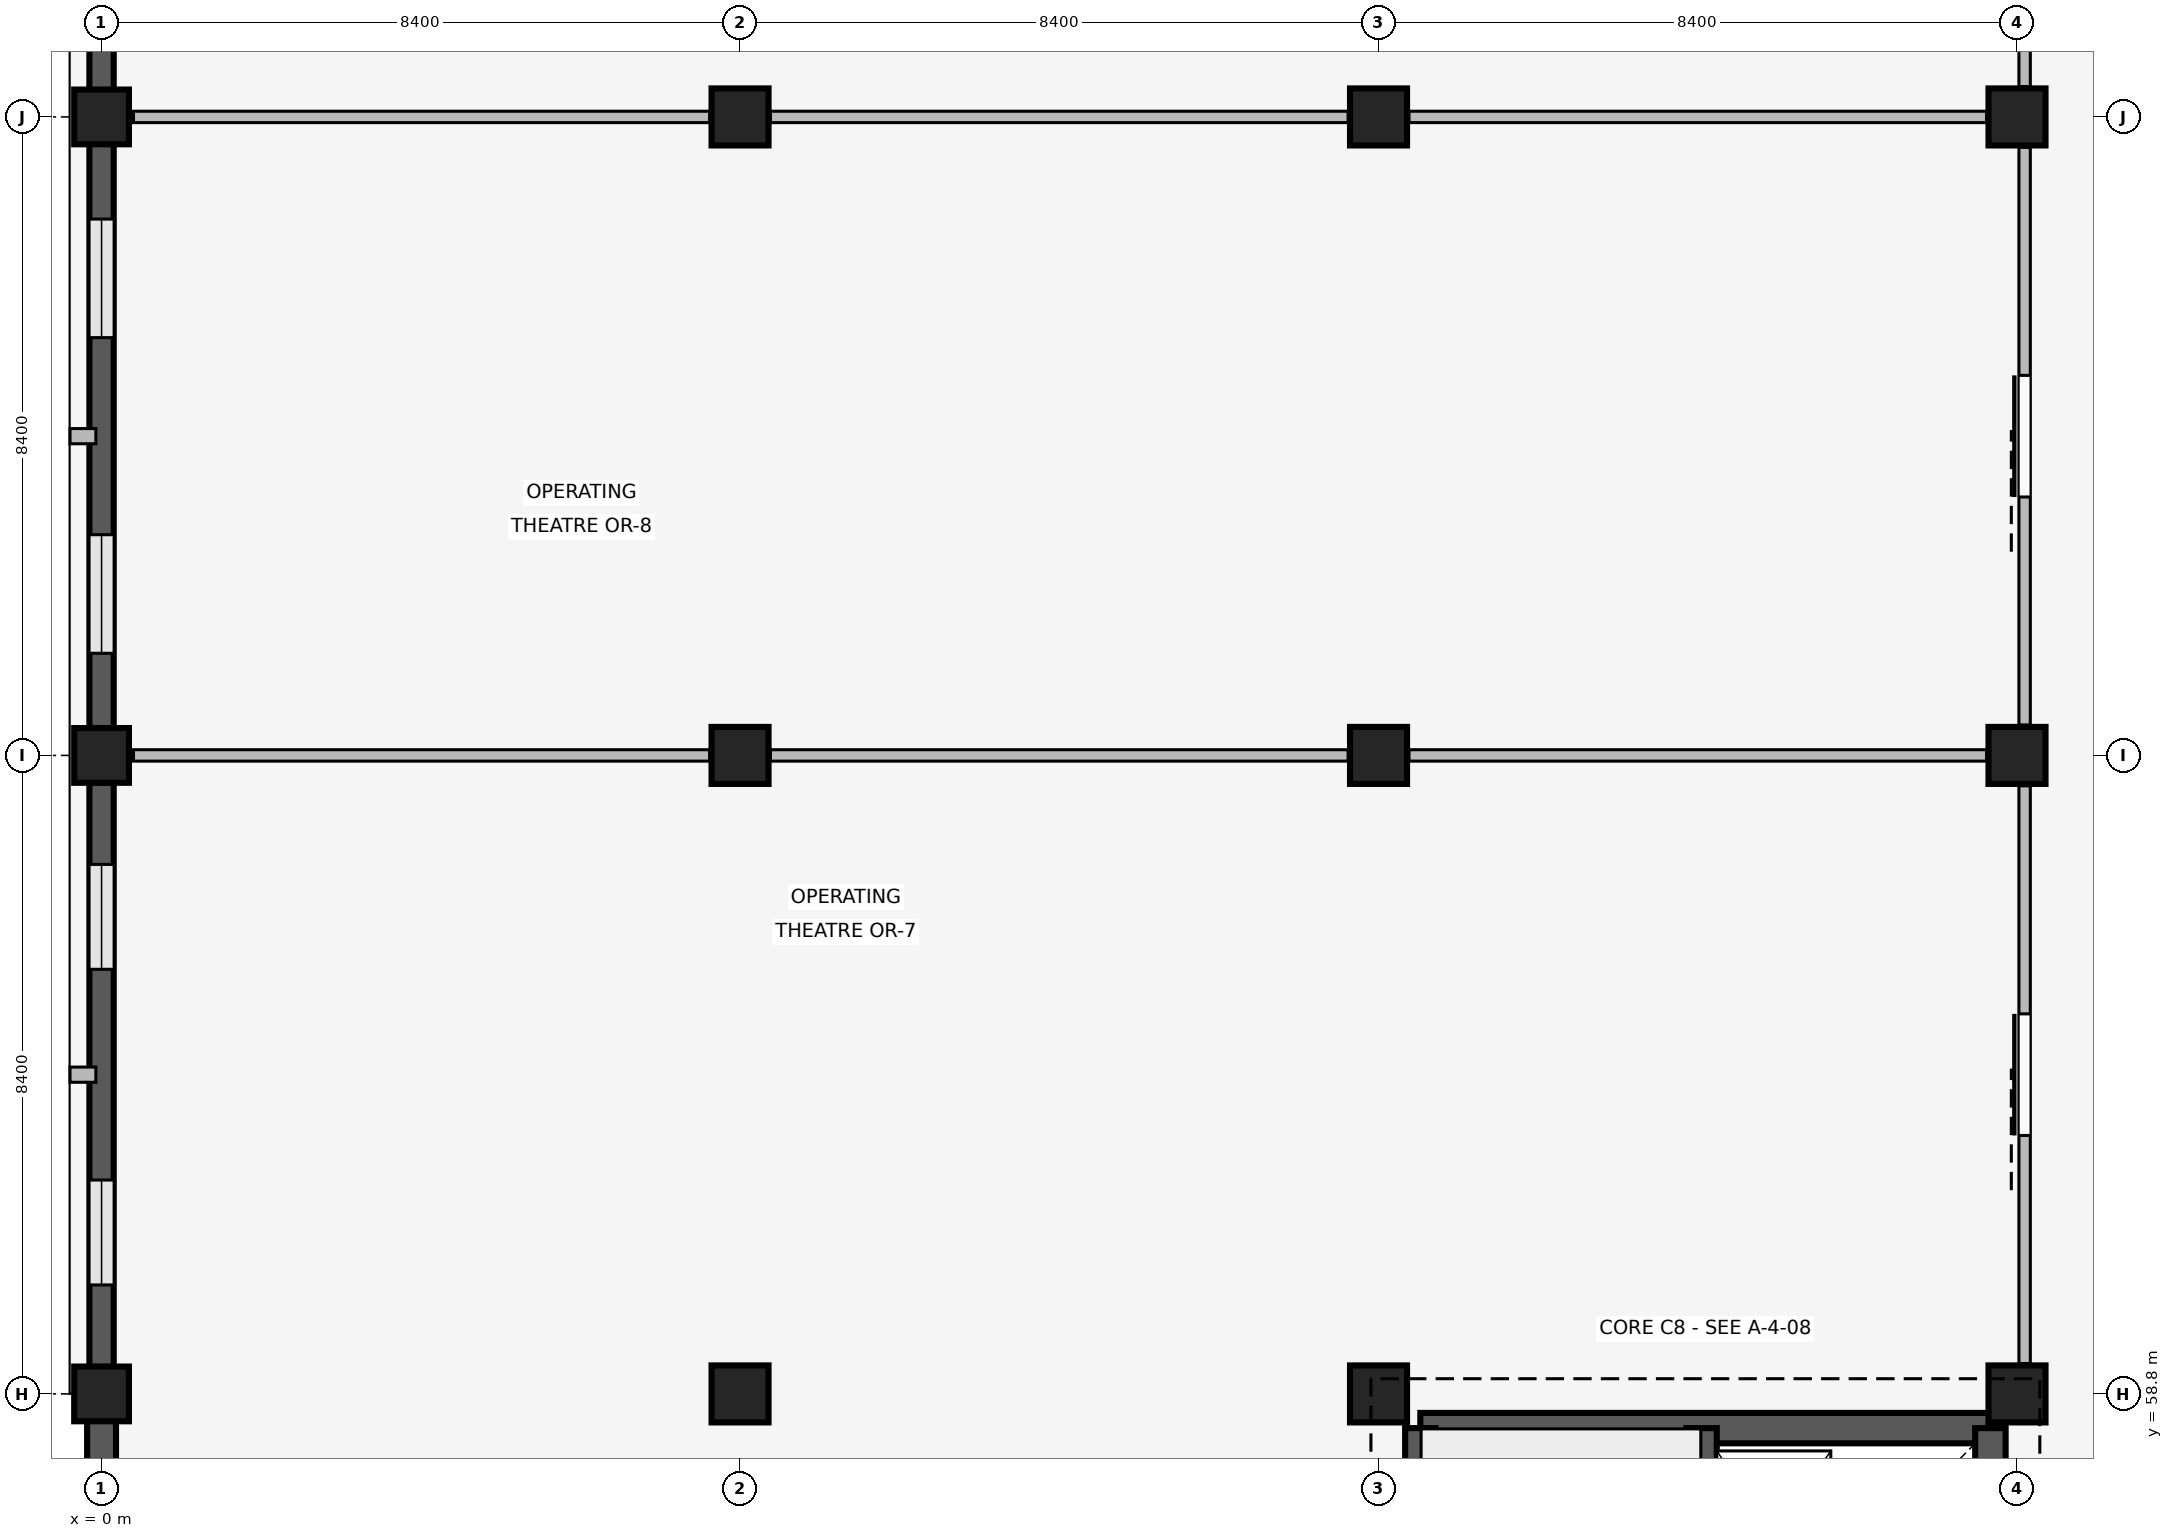
"""IFC4 building model, lengths in metres.
Left out: names, types, materials, properties, quantities, classifications, styles, units other than length and angle.
Written with IfcOpenShell. Run it as: python <this file> out.ifc"""

import sys

from ifc_helpers import new_model, si_unit, direction, frame, frame_2d, origin, origin_2d, place, context, subcontext, project, spatial, rectangle, extrude, element, fill, save


model = new_model("IFC4")
c1 = context("Model", 3, precision=1e-05, world=origin(), true_north=direction((0.0, 1.0)))
c2 = subcontext(c1, "Body", "Model", "MODEL_VIEW")
j1 = project(units=[si_unit("LENGTHUNIT", "METRE"), si_unit("PLANEANGLEUNIT", "RADIAN")], contexts=[c1])
p1 = place(None, origin())
s1 = spatial("IfcSite", under=j1, at=p1, CompositionType="ELEMENT")
p2 = place(p1, origin())
s2 = spatial("IfcBuilding", under=s1, at=p2, CompositionType="ELEMENT")
p3 = place(p2, frame((0.0, 0.0, 8.1)))
s3 = spatial("IfcBuildingStorey", under=s2, at=p3, CompositionType="ELEMENT", Elevation=8.1)
for number, where, z_axis, x_axis in (
    (1, (0.0, 58.8, 0.0), (0.0, 0.0, 1.0), (1.0, 0.0, 0.0)),
    (2, (0.0, 67.2, 0.0), (0.0, 0.0, 1.0), (1.0, 0.0, 0.0)),
    (3, (0.0, 75.6, 0.0), (0.0, 0.0, 1.0), (1.0, 0.0, 0.0)),
):
    element("IfcColumn", number, at=place(p3, frame(where, z_axis=z_axis, x_axis=x_axis)), inside=s3, PredefinedType="COLUMN", context=c2, shape_type="SweptSolid", body=[
        extrude(rectangle(XDim=0.72, YDim=0.72, at=origin_2d()), origin(), (0.0, 0.0, 1.0), 4.8),
    ])
for number, where, z_axis, x_axis in (
    (4, (8.4, 58.8, 0.0), (0.0, 0.0, 1.0), (1.0, 0.0, 0.0)),
    (5, (8.4, 67.2, 0.0), (0.0, 0.0, 1.0), (1.0, 0.0, 0.0)),
    (6, (8.4, 75.6, 0.0), (0.0, 0.0, 1.0), (1.0, 0.0, 0.0)),
    (7, (16.8, 58.8, 0.0), (0.0, 0.0, 1.0), (1.0, 0.0, 0.0)),
    (8, (16.8, 67.2, 0.0), (0.0, 0.0, 1.0), (1.0, 0.0, 0.0)),
    (9, (16.8, 75.6, 0.0), (0.0, 0.0, 1.0), (1.0, 0.0, 0.0)),
    (10, (25.2, 58.8, 0.0), (0.0, 0.0, 1.0), (1.0, 0.0, 0.0)),
    (11, (25.2, 67.2, 0.0), (0.0, 0.0, 1.0), (1.0, 0.0, 0.0)),
    (12, (25.2, 75.6, 0.0), (0.0, 0.0, 1.0), (1.0, 0.0, 0.0)),
):
    element("IfcColumn", number, at=place(p3, frame(where, z_axis=z_axis, x_axis=x_axis)), inside=s3, PredefinedType="COLUMN", context=c2, shape_type="SweptSolid", body=[
        extrude(rectangle(XDim=0.75, YDim=0.75, at=origin_2d()), origin(), (0.0, 0.0, 1.0), 4.8),
    ])
p4 = place(p3, frame((0.0, 50.755, 0.0), z_axis=(0.0, 0.0, 1.0), x_axis=(0.0, 1.0, 0.0)))
e13 = element("IfcWall", 13, at=p4, inside=s3, PredefinedType="SOLIDWALL", context=c2, shape_type="SweptSolid", body=[
    extrude(rectangle(XDim=7.69, YDim=0.38, at=frame_2d((3.845, 0.0))), origin(), (0.0, 0.0, 1.0), 3.86),
])
p5 = place(p3, frame((0.0, 59.155, 0.0), z_axis=(0.0, 0.0, 1.0), x_axis=(0.0, 1.0, 0.0)))
e14 = element("IfcWall", 14, at=p5, inside=s3, PredefinedType="SOLIDWALL", context=c2, shape_type="SweptSolid", body=[
    extrude(rectangle(XDim=7.69, YDim=0.32, at=frame_2d((3.845, 0.0))), origin(), (0.0, 0.0, 1.0), 3.86),
])
p6 = place(p5, frame((1.079, 0.0, 0.85)))
e15 = element("IfcOpeningElement", 15, at=p6, cuts=e14, PredefinedType="OPENING", context=c2, shape_type="SweptSolid", body=[
    extrude(rectangle(XDim=1.38, YDim=1.5, at=frame_2d((0.69, 0.75))), frame((0.0, 0.17, 0.0), z_axis=(0.0, -1.0, 0.0), x_axis=(1.0, 0.0, 0.0)), (0.0, 0.0, 1.0), 0.34),
])
p7 = place(p5, frame((5.231, 0.0, 0.85)))
e16 = element("IfcOpeningElement", 16, at=p7, cuts=e14, PredefinedType="OPENING", context=c2, shape_type="SweptSolid", body=[
    extrude(rectangle(XDim=1.38, YDim=1.5, at=frame_2d((0.69, 0.75))), frame((0.0, 0.17, 0.0), z_axis=(0.0, -1.0, 0.0), x_axis=(1.0, 0.0, 0.0)), (0.0, 0.0, 1.0), 0.34),
])
p8 = place(p3, frame((-0.075, 63.0, 0.0), z_axis=(0.0, 0.0, 1.0), x_axis=(-1.0, 0.0, 0.0)))
e17 = element("IfcWall", 17, at=p8, inside=s3, PredefinedType="ELEMENTEDWALL", context=c2, shape_type="SweptSolid", body=[
    extrude(rectangle(XDim=0.34, YDim=0.2, at=frame_2d((0.17, 0.0))), origin(), (0.0, 0.0, 1.0), 3.84),
])
p9 = place(p3, frame((0.0, 67.555, 0.0), z_axis=(0.0, 0.0, 1.0), x_axis=(0.0, 1.0, 0.0)))
e18 = element("IfcWall", 18, at=p9, inside=s3, PredefinedType="SOLIDWALL", context=c2, shape_type="SweptSolid", body=[
    extrude(rectangle(XDim=7.69, YDim=0.32, at=frame_2d((3.845, 0.0))), origin(), (0.0, 0.0, 1.0), 3.86),
])
p10 = place(p9, frame((0.989, 0.0, 0.85)))
e19 = element("IfcOpeningElement", 19, at=p10, cuts=e18, PredefinedType="OPENING", context=c2, shape_type="SweptSolid", body=[
    extrude(rectangle(XDim=1.56, YDim=1.7, at=frame_2d((0.78, 0.85))), frame((0.0, 0.17, 0.0), z_axis=(0.0, -1.0, 0.0), x_axis=(1.0, 0.0, 0.0)), (0.0, 0.0, 1.0), 0.34),
])
p11 = place(p9, frame((5.141, 0.0, 0.85)))
e20 = element("IfcOpeningElement", 20, at=p11, cuts=e18, PredefinedType="OPENING", context=c2, shape_type="SweptSolid", body=[
    extrude(rectangle(XDim=1.56, YDim=1.7, at=frame_2d((0.78, 0.85))), frame((0.0, 0.17, 0.0), z_axis=(0.0, -1.0, 0.0), x_axis=(1.0, 0.0, 0.0)), (0.0, 0.0, 1.0), 0.34),
])
p12 = place(p3, frame((-0.075, 71.4, 0.0), z_axis=(0.0, 0.0, 1.0), x_axis=(-1.0, 0.0, 0.0)))
e21 = element("IfcWall", 21, at=p12, inside=s3, PredefinedType="ELEMENTEDWALL", context=c2, shape_type="SweptSolid", body=[
    extrude(rectangle(XDim=0.34, YDim=0.2, at=frame_2d((0.17, 0.0))), origin(), (0.0, 0.0, 1.0), 3.84),
])
p13 = place(p3, frame((0.0, 75.955, 0.0), z_axis=(0.0, 0.0, 1.0), x_axis=(0.0, 1.0, 0.0)))
e22 = element("IfcWall", 22, at=p13, inside=s3, PredefinedType="SOLIDWALL", context=c2, shape_type="SweptSolid", body=[
    extrude(rectangle(XDim=7.69, YDim=0.32, at=frame_2d((3.845, 0.0))), origin(), (0.0, 0.0, 1.0), 3.86),
])
p14 = place(p13, frame((0.959, 0.0, 0.85)))
e23 = element("IfcOpeningElement", 23, at=p14, cuts=e22, PredefinedType="OPENING", context=c2, shape_type="SweptSolid", body=[
    extrude(rectangle(XDim=1.62, YDim=1.8, at=frame_2d((0.81, 0.9))), frame((0.0, 0.17, 0.0), z_axis=(0.0, -1.0, 0.0), x_axis=(1.0, 0.0, 0.0)), (0.0, 0.0, 1.0), 0.34),
])
p15 = place(p13, frame((5.111, 0.0, 0.85)))
e24 = element("IfcOpeningElement", 24, at=p15, cuts=e22, PredefinedType="OPENING", context=c2, shape_type="SweptSolid", body=[
    extrude(rectangle(XDim=1.62, YDim=1.8, at=frame_2d((0.81, 0.9))), frame((0.0, 0.17, 0.0), z_axis=(0.0, -1.0, 0.0), x_axis=(1.0, 0.0, 0.0)), (0.0, 0.0, 1.0), 0.34),
])
p16 = place(p3, frame((17.35, 58.35, 0.0), z_axis=(0.0, 0.0, 1.0), x_axis=(1.0, 0.0, 0.0)))
e25 = element("IfcWall", 25, at=p16, inside=s3, PredefinedType="SHEAR", context=c2, shape_type="SweptSolid", body=[
    extrude(rectangle(XDim=7.5, YDim=0.4, at=frame_2d((3.75, 0.0))), origin(), (0.0, 0.0, 1.0), 4.64),
])
p17 = place(p3, frame((17.35, 50.8, 0.0), z_axis=(0.0, 0.0, 1.0), x_axis=(0.0, 1.0, 0.0)))
e26 = element("IfcWall", 26, at=p17, inside=s3, PredefinedType="SHEAR", context=c2, shape_type="SweptSolid", body=[
    extrude(rectangle(XDim=7.55, YDim=0.4, at=frame_2d((3.775, 0.0))), origin(), (0.0, 0.0, 1.0), 4.64),
])
p18 = place(p3, frame((24.85, 50.8, 0.0), z_axis=(0.0, 0.0, 1.0), x_axis=(0.0, 1.0, 0.0)))
e27 = element("IfcWall", 27, at=p18, inside=s3, PredefinedType="SHEAR", context=c2, shape_type="SweptSolid", body=[
    extrude(rectangle(XDim=7.55, YDim=0.4, at=frame_2d((3.775, 0.0))), origin(), (0.0, 0.0, 1.0), 4.64),
])
p19 = place(p18, frame((2.4, 0.0, 0.0)))
e28 = element("IfcOpeningElement", 28, at=p19, cuts=e27, PredefinedType="OPENING", context=c2, shape_type="SweptSolid", body=[
    extrude(rectangle(XDim=1.2, YDim=2.2, at=frame_2d((0.6, 1.1))), frame((0.0, 0.21, 0.0), z_axis=(0.0, -1.0, 0.0), x_axis=(1.0, 0.0, 0.0)), (0.0, 0.0, 1.0), 0.42),
])
p20 = place(p3, frame((21.05, 50.8, 0.0), z_axis=(0.0, 0.0, 1.0), x_axis=(0.0, 1.0, 0.0)))
e29 = element("IfcWall", 29, at=p20, inside=s3, PredefinedType="SHEAR", context=c2, shape_type="SweptSolid", body=[
    extrude(rectangle(XDim=7.55, YDim=0.4, at=frame_2d((3.775, 0.0))), origin(), (0.0, 0.0, 1.0), 4.64),
])
p21 = place(p20, frame((0.28, 0.0, 0.0)))
e30 = element("IfcOpeningElement", 30, at=p21, cuts=e29, PredefinedType="OPENING", context=c2, shape_type="SweptSolid", body=[
    extrude(rectangle(XDim=1.0, YDim=2.15, at=frame_2d((0.5, 1.075))), frame((0.0, 0.21, 0.0), z_axis=(0.0, -1.0, 0.0), x_axis=(1.0, 0.0, 0.0)), (0.0, 0.0, 1.0), 0.42),
])
p22 = place(p3, frame((25.3, 59.2, 0.0), z_axis=(0.0, 0.0, 1.0), x_axis=(0.0, 1.0, 0.0)))
e31 = element("IfcWall", 31, at=p22, inside=s3, PredefinedType="PARTITIONING", context=c2, shape_type="SweptSolid", body=[
    extrude(rectangle(XDim=7.6, YDim=0.15, at=frame_2d((3.8, 0.0))), origin(), (0.0, 0.0, 1.0), 3.84),
])
p23 = place(p22, frame((3.0, 0.0, 0.0)))
e32 = element("IfcOpeningElement", 32, at=p23, cuts=e31, PredefinedType="OPENING", context=c2, shape_type="SweptSolid", body=[
    extrude(rectangle(XDim=1.6, YDim=2.35, at=frame_2d((0.8, 1.175))), frame((0.0, 0.085, 0.0), z_axis=(0.0, -1.0, 0.0), x_axis=(1.0, 0.0, 0.0)), (0.0, 0.0, 1.0), 0.17),
])
p24 = place(p3, frame((25.3, 67.6, 0.0), z_axis=(0.0, 0.0, 1.0), x_axis=(0.0, 1.0, 0.0)))
e33 = element("IfcWall", 33, at=p24, inside=s3, PredefinedType="PARTITIONING", context=c2, shape_type="SweptSolid", body=[
    extrude(rectangle(XDim=7.6, YDim=0.15, at=frame_2d((3.8, 0.0))), origin(), (0.0, 0.0, 1.0), 3.84),
])
p25 = place(p24, frame((3.0, 0.0, 0.0)))
e34 = element("IfcOpeningElement", 34, at=p25, cuts=e33, PredefinedType="OPENING", context=c2, shape_type="SweptSolid", body=[
    extrude(rectangle(XDim=1.6, YDim=2.35, at=frame_2d((0.8, 1.175))), frame((0.0, 0.085, 0.0), z_axis=(0.0, -1.0, 0.0), x_axis=(1.0, 0.0, 0.0)), (0.0, 0.0, 1.0), 0.17),
])
p26 = place(p3, frame((0.42, 67.2, 0.0), z_axis=(0.0, 0.0, 1.0), x_axis=(1.0, 0.0, 0.0)))
e35 = element("IfcWall", 35, at=p26, inside=s3, PredefinedType="PARTITIONING", context=c2, shape_type="SweptSolid", body=[
    extrude(rectangle(XDim=7.58, YDim=0.15, at=frame_2d((3.79, 0.0))), origin(), (0.0, 0.0, 1.0), 3.84),
])
p27 = place(p3, frame((8.8, 67.2, 0.0), z_axis=(0.0, 0.0, 1.0), x_axis=(1.0, 0.0, 0.0)))
e36 = element("IfcWall", 36, at=p27, inside=s3, PredefinedType="PARTITIONING", context=c2, shape_type="SweptSolid", body=[
    extrude(rectangle(XDim=7.6, YDim=0.15, at=frame_2d((3.8, 0.0))), origin(), (0.0, 0.0, 1.0), 3.84),
])
p28 = place(p3, frame((17.2, 67.2, 0.0), z_axis=(0.0, 0.0, 1.0), x_axis=(1.0, 0.0, 0.0)))
e37 = element("IfcWall", 37, at=p28, inside=s3, PredefinedType="PARTITIONING", context=c2, shape_type="SweptSolid", body=[
    extrude(rectangle(XDim=7.6, YDim=0.15, at=frame_2d((3.8, 0.0))), origin(), (0.0, 0.0, 1.0), 3.84),
])
p29 = place(p3, frame((0.42, 75.6, 0.0), z_axis=(0.0, 0.0, 1.0), x_axis=(1.0, 0.0, 0.0)))
e38 = element("IfcWall", 38, at=p29, inside=s3, PredefinedType="PARTITIONING", context=c2, shape_type="SweptSolid", body=[
    extrude(rectangle(XDim=7.58, YDim=0.15, at=frame_2d((3.79, 0.0))), origin(), (0.0, 0.0, 1.0), 3.84),
])
p30 = place(p3, frame((8.8, 75.6, 0.0), z_axis=(0.0, 0.0, 1.0), x_axis=(1.0, 0.0, 0.0)))
e39 = element("IfcWall", 39, at=p30, inside=s3, PredefinedType="PARTITIONING", context=c2, shape_type="SweptSolid", body=[
    extrude(rectangle(XDim=7.6, YDim=0.15, at=frame_2d((3.8, 0.0))), origin(), (0.0, 0.0, 1.0), 3.84),
])
p31 = place(p3, frame((17.2, 75.6, 0.0), z_axis=(0.0, 0.0, 1.0), x_axis=(1.0, 0.0, 0.0)))
e40 = element("IfcWall", 40, at=p31, inside=s3, PredefinedType="PARTITIONING", context=c2, shape_type="SweptSolid", body=[
    extrude(rectangle(XDim=7.6, YDim=0.15, at=frame_2d((3.8, 0.0))), origin(), (0.0, 0.0, 1.0), 3.84),
])
p32 = place(p3, frame((25.3, 76.0, 0.0), z_axis=(0.0, 0.0, 1.0), x_axis=(0.0, 1.0, 0.0)))
e41 = element("IfcWall", 41, at=p32, inside=s3, PredefinedType="PARTITIONING", context=c2, shape_type="SweptSolid", body=[
    extrude(rectangle(XDim=16.0, YDim=0.15, at=frame_2d((8.0, 0.0))), origin(), (0.0, 0.0, 1.0), 3.84),
])
p33 = place(p32, frame((3.4, 0.0, 0.0)))
e42 = element("IfcOpeningElement", 42, at=p33, cuts=e41, PredefinedType="OPENING", context=c2, shape_type="SweptSolid", body=[
    extrude(rectangle(XDim=1.5, YDim=2.3, at=frame_2d((0.75, 1.15))), frame((0.0, 0.085, 0.0), z_axis=(0.0, -1.0, 0.0), x_axis=(1.0, 0.0, 0.0)), (0.0, 0.0, 1.0), 0.17),
])
p34 = place(p6, origin())
e43 = element("IfcWindow", 43, at=p34, inside=s3, PartitioningType="SINGLE_PANEL", PredefinedType="WINDOW", context=c2, shape_type="SweptSolid", body=[
    extrude(rectangle(XDim=1.38, YDim=1.5, at=frame_2d((0.69, 0.75))), frame((0.0, 0.03, 0.0), z_axis=(0.0, -1.0, 0.0), x_axis=(1.0, 0.0, 0.0)), (0.0, 0.0, 1.0), 0.06),
])
fill(e15, e43)
p35 = place(p7, origin())
e44 = element("IfcWindow", 44, at=p35, inside=s3, PartitioningType="SINGLE_PANEL", PredefinedType="WINDOW", context=c2, shape_type="SweptSolid", body=[
    extrude(rectangle(XDim=1.38, YDim=1.5, at=frame_2d((0.69, 0.75))), frame((0.0, 0.03, 0.0), z_axis=(0.0, -1.0, 0.0), x_axis=(1.0, 0.0, 0.0)), (0.0, 0.0, 1.0), 0.06),
])
fill(e16, e44)
p36 = place(p10, origin())
e45 = element("IfcWindow", 45, at=p36, inside=s3, PartitioningType="SINGLE_PANEL", PredefinedType="WINDOW", context=c2, shape_type="SweptSolid", body=[
    extrude(rectangle(XDim=1.56, YDim=1.7, at=frame_2d((0.78, 0.85))), frame((0.0, 0.03, 0.0), z_axis=(0.0, -1.0, 0.0), x_axis=(1.0, 0.0, 0.0)), (0.0, 0.0, 1.0), 0.06),
])
fill(e19, e45)
p37 = place(p11, origin())
e46 = element("IfcWindow", 46, at=p37, inside=s3, PartitioningType="SINGLE_PANEL", PredefinedType="WINDOW", context=c2, shape_type="SweptSolid", body=[
    extrude(rectangle(XDim=1.56, YDim=1.7, at=frame_2d((0.78, 0.85))), frame((0.0, 0.03, 0.0), z_axis=(0.0, -1.0, 0.0), x_axis=(1.0, 0.0, 0.0)), (0.0, 0.0, 1.0), 0.06),
])
fill(e20, e46)
p38 = place(p23, origin())
e47 = element("IfcDoor", 47, at=p38, inside=s3, OperationType="SLIDING_TO_LEFT", PredefinedType="DOOR", context=c2, shape_type="SweptSolid", body=[
    extrude(rectangle(XDim=1.6, YDim=2.35, at=frame_2d((0.8, 1.175))), frame((0.0, 0.025, 0.0), z_axis=(0.0, -1.0, 0.0), x_axis=(1.0, 0.0, 0.0)), (0.0, 0.0, 1.0), 0.05),
])
fill(e32, e47)
p39 = place(p25, origin())
e48 = element("IfcDoor", 48, at=p39, inside=s3, OperationType="SLIDING_TO_LEFT", PredefinedType="DOOR", context=c2, shape_type="SweptSolid", body=[
    extrude(rectangle(XDim=1.6, YDim=2.35, at=frame_2d((0.8, 1.175))), frame((0.0, 0.025, 0.0), z_axis=(0.0, -1.0, 0.0), x_axis=(1.0, 0.0, 0.0)), (0.0, 0.0, 1.0), 0.05),
])
fill(e34, e48)
save(model, sys.argv[1])
